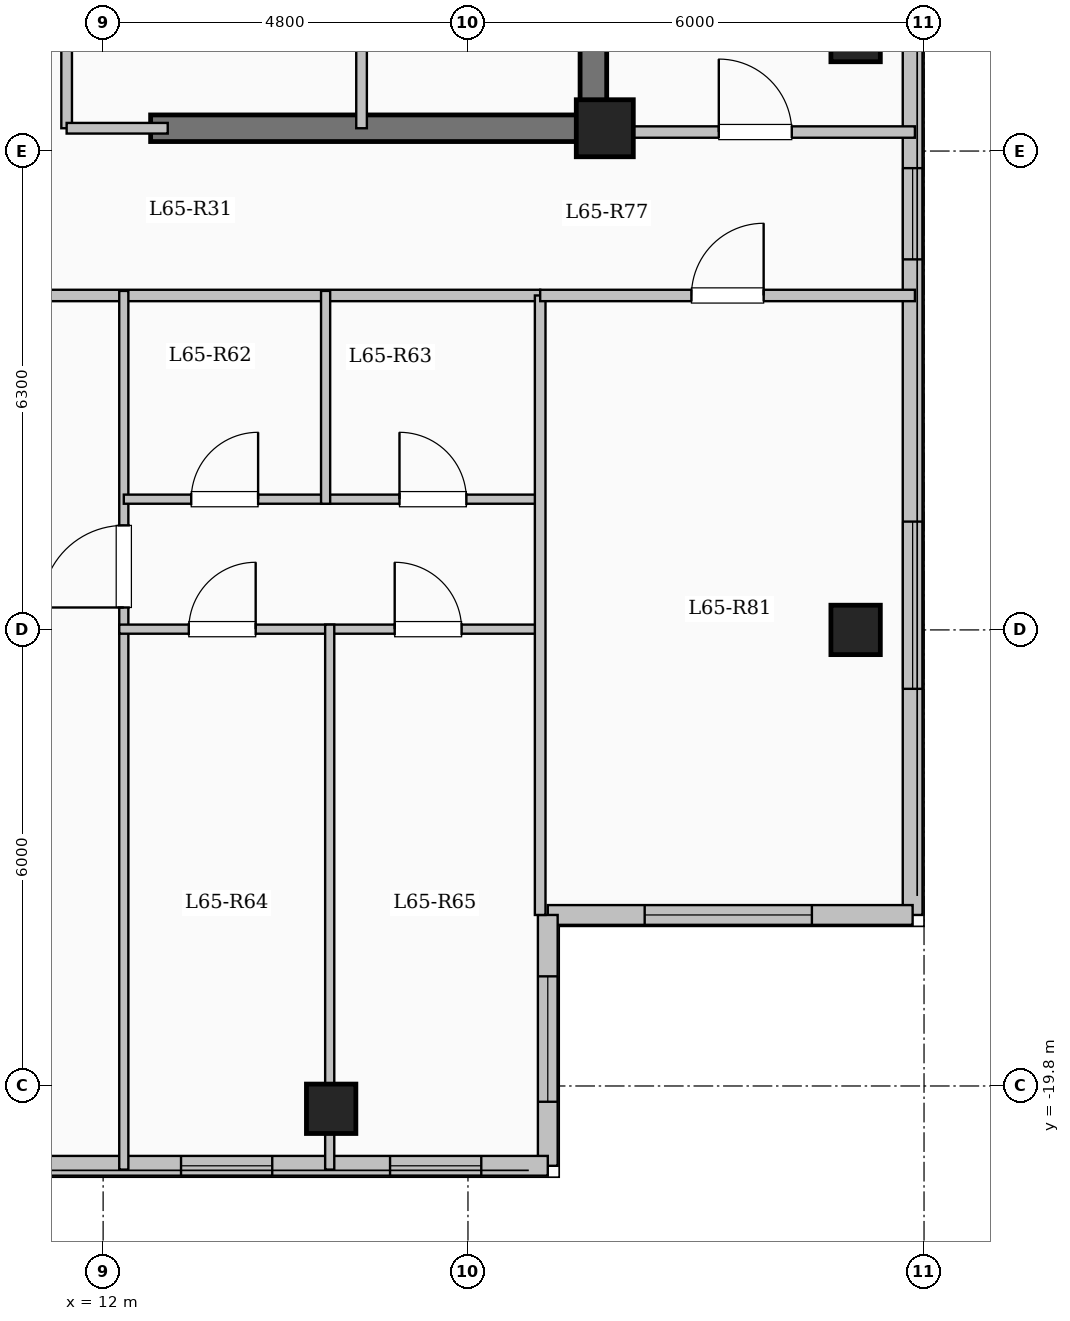
"""IFC4 building model, lengths in metres.
Left out: names, types, materials, properties, quantities, classifications, styles, units other than length and angle.
Written with IfcOpenShell. Run it as: python <this file> out.ifc"""

import sys

from ifc_helpers import new_model, si_unit, direction, frame, frame_2d, origin, origin_2d, place, context, subcontext, project, spatial, rectangle, extrude, element, fill, save


model = new_model("IFC4")
c1 = context("Model", 3, precision=1e-05, world=origin(), true_north=direction((0.0, 1.0)))
c2 = subcontext(c1, "Body", "Model", "MODEL_VIEW")
j1 = project(units=[si_unit("LENGTHUNIT", "METRE"), si_unit("PLANEANGLEUNIT", "RADIAN")], contexts=[c1])
p1 = place(None, origin())
s1 = spatial("IfcSite", under=j1, at=p1, CompositionType="ELEMENT")
p2 = place(p1, origin())
s2 = spatial("IfcBuilding", under=s1, at=p2, CompositionType="ELEMENT")
p3 = place(p2, frame((0.0, 0.0, 241.5)))
s3 = spatial("IfcBuildingStorey", under=s2, at=p3, CompositionType="ELEMENT", Elevation=241.5)
p4 = place(p3, frame((18.6, -7.2, 0.0), z_axis=(0.0, 0.0, 1.0), x_axis=(1.0, 0.0, 0.0)))
e1 = element("IfcColumn", 1, at=p4, inside=s3, PredefinedType="COLUMN", context=c2, shape_type="SweptSolid", body=[
    extrude(rectangle(XDim=0.75, YDim=0.75, at=origin_2d()), origin(), (0.0, 0.0, 1.0), 3.35),
])
for number, where, z_axis, x_axis in (
    (2, (15.0, -20.1, 0.0), (0.0, 0.0, 1.0), (1.0, 0.0, 0.0)),
    (3, (21.9, -13.8, 0.0), (0.0, 0.0, 1.0), (1.0, 0.0, 0.0)),
    (4, (21.9, -6.0, 0.0), (0.0, 0.0, 1.0), (1.0, 0.0, 0.0)),
):
    element("IfcColumn", number, at=place(p3, frame(where, z_axis=z_axis, x_axis=x_axis)), inside=s3, PredefinedType="COLUMN", context=c2, shape_type="SweptSolid", body=[
        extrude(rectangle(XDim=0.65, YDim=0.65, at=origin_2d()), origin(), (0.0, 0.0, 1.0), 3.35),
    ])
p5 = place(p3, frame((22.65, 17.55, 0.0), z_axis=(0.0, 0.0, 1.0), x_axis=(0.0, -1.0, 0.0)))
e5 = element("IfcWall", 5, at=p5, inside=s3, PredefinedType="SOLIDWALL", context=c2, shape_type="SweptSolid", body=[
    extrude(rectangle(XDim=35.1, YDim=0.26, at=frame_2d((17.55, 0.0))), origin(), (0.0, 0.0, 1.0), 3.1),
])
p6 = place(p5, frame((1.525, 0.0, 0.9)))
e6 = element("IfcOpeningElement", 6, at=p6, cuts=e5, PredefinedType="OPENING", context=c2, shape_type="SweptSolid", body=[
    extrude(rectangle(XDim=2.0, YDim=1.7, at=frame_2d((1.0, 0.85))), frame((0.0, 0.14, 0.0), z_axis=(0.0, -1.0, 0.0), x_axis=(1.0, 0.0, 0.0)), (0.0, 0.0, 1.0), 0.28),
])
p7 = place(p5, frame((5.425, 0.0, 0.95)))
e7 = element("IfcOpeningElement", 7, at=p7, cuts=e5, PredefinedType="OPENING", context=c2, shape_type="SweptSolid", body=[
    extrude(rectangle(XDim=1.0, YDim=1.5, at=frame_2d((0.5, 0.75))), frame((0.0, 0.14, 0.0), z_axis=(0.0, -1.0, 0.0), x_axis=(1.0, 0.0, 0.0)), (0.0, 0.0, 1.0), 0.28),
])
p8 = place(p5, frame((8.675, 0.0, 0.9)))
e8 = element("IfcOpeningElement", 8, at=p8, cuts=e5, PredefinedType="OPENING", context=c2, shape_type="SweptSolid", body=[
    extrude(rectangle(XDim=2.0, YDim=1.7, at=frame_2d((1.0, 0.85))), frame((0.0, 0.14, 0.0), z_axis=(0.0, -1.0, 0.0), x_axis=(1.0, 0.0, 0.0)), (0.0, 0.0, 1.0), 0.28),
])
p9 = place(p5, frame((13.5, 0.0, 0.9)))
e9 = element("IfcOpeningElement", 9, at=p9, cuts=e5, PredefinedType="OPENING", context=c2, shape_type="SweptSolid", body=[
    extrude(rectangle(XDim=1.65, YDim=1.6, at=frame_2d((0.825, 0.8))), frame((0.0, 0.14, 0.0), z_axis=(0.0, -1.0, 0.0), x_axis=(1.0, 0.0, 0.0)), (0.0, 0.0, 1.0), 0.28),
])
p10 = place(p5, frame((19.35, 0.0, 0.9)))
e10 = element("IfcOpeningElement", 10, at=p10, cuts=e5, PredefinedType="OPENING", context=c2, shape_type="SweptSolid", body=[
    extrude(rectangle(XDim=2.2, YDim=1.75, at=frame_2d((1.1, 0.875))), frame((0.0, 0.14, 0.0), z_axis=(0.0, -1.0, 0.0), x_axis=(1.0, 0.0, 0.0)), (0.0, 0.0, 1.0), 0.28),
])
p11 = place(p5, frame((25.275, 0.0, 0.95)))
e11 = element("IfcOpeningElement", 11, at=p11, cuts=e5, PredefinedType="OPENING", context=c2, shape_type="SweptSolid", body=[
    extrude(rectangle(XDim=1.2, YDim=1.5, at=frame_2d((0.6, 0.75))), frame((0.0, 0.14, 0.0), z_axis=(0.0, -1.0, 0.0), x_axis=(1.0, 0.0, 0.0)), (0.0, 0.0, 1.0), 0.28),
])
p12 = place(p5, frame((29.925, 0.0, 0.9)))
e12 = element("IfcOpeningElement", 12, at=p12, cuts=e5, PredefinedType="OPENING", context=c2, shape_type="SweptSolid", body=[
    extrude(rectangle(XDim=2.2, YDim=1.75, at=frame_2d((1.1, 0.875))), frame((0.0, 0.14, 0.0), z_axis=(0.0, -1.0, 0.0), x_axis=(1.0, 0.0, 0.0)), (0.0, 0.0, 1.0), 0.28),
])
p13 = place(p3, frame((22.65, -17.55, 0.0), z_axis=(0.0, 0.0, 1.0), x_axis=(-1.0, 0.0, 0.0)))
e13 = element("IfcWall", 13, at=p13, inside=s3, PredefinedType="SOLIDWALL", context=c2, shape_type="SweptSolid", body=[
    extrude(rectangle(XDim=4.8, YDim=0.26, at=frame_2d((2.4, 0.0))), origin(), (0.0, 0.0, 1.0), 3.1),
])
p14 = place(p13, frame((1.325, 0.0, 0.9)))
e14 = element("IfcOpeningElement", 14, at=p14, cuts=e13, PredefinedType="OPENING", context=c2, shape_type="SweptSolid", body=[
    extrude(rectangle(XDim=2.2, YDim=1.75, at=frame_2d((1.1, 0.875))), frame((0.0, 0.14, 0.0), z_axis=(0.0, -1.0, 0.0), x_axis=(1.0, 0.0, 0.0)), (0.0, 0.0, 1.0), 0.28),
])
p15 = place(p3, frame((17.85, -17.55, 0.0), z_axis=(0.0, 0.0, 1.0), x_axis=(0.0, -1.0, 0.0)))
e15 = element("IfcWall", 15, at=p15, inside=s3, PredefinedType="SOLIDWALL", context=c2, shape_type="SweptSolid", body=[
    extrude(rectangle(XDim=3.3, YDim=0.26, at=frame_2d((1.65, 0.0))), origin(), (0.0, 0.0, 1.0), 3.1),
])
p16 = place(p15, frame((0.808, 0.0, 0.9)))
e16 = element("IfcOpeningElement", 16, at=p16, cuts=e15, PredefinedType="OPENING", context=c2, shape_type="SweptSolid", body=[
    extrude(rectangle(XDim=1.65, YDim=1.6, at=frame_2d((0.825, 0.8))), frame((0.0, 0.14, 0.0), z_axis=(0.0, -1.0, 0.0), x_axis=(1.0, 0.0, 0.0)), (0.0, 0.0, 1.0), 0.28),
])
p17 = place(p3, frame((17.85, -20.85, 0.0), z_axis=(0.0, 0.0, 1.0), x_axis=(-1.0, 0.0, 0.0)))
e17 = element("IfcWall", 17, at=p17, inside=s3, PredefinedType="SOLIDWALL", context=c2, shape_type="SweptSolid", body=[
    extrude(rectangle(XDim=10.5, YDim=0.26, at=frame_2d((5.25, 0.0))), origin(), (0.0, 0.0, 1.0), 3.1),
])
p18 = place(p17, frame((0.875, 0.0, 0.95)))
e18 = element("IfcOpeningElement", 18, at=p18, cuts=e17, PredefinedType="OPENING", context=c2, shape_type="SweptSolid", body=[
    extrude(rectangle(XDim=1.2, YDim=1.5, at=frame_2d((0.6, 0.75))), frame((0.0, 0.14, 0.0), z_axis=(0.0, -1.0, 0.0), x_axis=(1.0, 0.0, 0.0)), (0.0, 0.0, 1.0), 0.28),
])
p19 = place(p17, frame((3.625, 0.0, 0.95)))
e19 = element("IfcOpeningElement", 19, at=p19, cuts=e17, PredefinedType="OPENING", context=c2, shape_type="SweptSolid", body=[
    extrude(rectangle(XDim=1.2, YDim=1.5, at=frame_2d((0.6, 0.75))), frame((0.0, 0.14, 0.0), z_axis=(0.0, -1.0, 0.0), x_axis=(1.0, 0.0, 0.0)), (0.0, 0.0, 1.0), 0.28),
])
p20 = place(p17, frame((6.6, 0.0, 0.9)))
e20 = element("IfcOpeningElement", 20, at=p20, cuts=e17, PredefinedType="OPENING", context=c2, shape_type="SweptSolid", body=[
    extrude(rectangle(XDim=1.65, YDim=1.6, at=frame_2d((0.825, 0.8))), frame((0.0, 0.14, 0.0), z_axis=(0.0, -1.0, 0.0), x_axis=(1.0, 0.0, 0.0)), (0.0, 0.0, 1.0), 0.28),
])
p21 = place(p17, frame((9.505, 0.0, 0.95)))
e21 = element("IfcOpeningElement", 21, at=p21, cuts=e17, PredefinedType="OPENING", context=c2, shape_type="SweptSolid", body=[
    extrude(rectangle(XDim=0.85, YDim=1.5, at=frame_2d((0.425, 0.75))), frame((0.0, 0.14, 0.0), z_axis=(0.0, -1.0, 0.0), x_axis=(1.0, 0.0, 0.0)), (0.0, 0.0, 1.0), 0.28),
])
p22 = place(p3, frame((18.45, -7.375, 0.0), z_axis=(0.0, 0.0, 1.0), x_axis=(0.0, 1.0, 0.0)))
e22 = element("IfcWall", 22, at=p22, inside=s3, PredefinedType="SHEAR", context=c2, shape_type="SweptSolid", body=[
    extrude(rectangle(XDim=14.05, YDim=0.35, at=frame_2d((7.025, 0.0))), origin(), (0.0, 0.0, 1.0), 3.35),
])
p23 = place(p3, frame((12.625, -7.2, 0.0), z_axis=(0.0, 0.0, 1.0), x_axis=(1.0, 0.0, 0.0)))
e23 = element("IfcWall", 23, at=p23, inside=s3, PredefinedType="SHEAR", context=c2, shape_type="SweptSolid", body=[
    extrude(rectangle(XDim=6.0, YDim=0.35, at=frame_2d((3.0, 0.0))), origin(), (0.0, 0.0, 1.0), 3.35),
])
p24 = place(p3, frame((15.4, -7.2, 0.0), z_axis=(0.0, 0.0, 1.0), x_axis=(0.0, 1.0, 0.0)))
e24 = element("IfcWall", 24, at=p24, inside=s3, PredefinedType="PARTITIONING", context=c2, shape_type="SweptSolid", body=[
    extrude(rectangle(XDim=10.45, YDim=0.14, at=frame_2d((5.225, 0.0))), origin(), (0.0, 0.0, 1.0), 3.1),
])
p25 = place(p24, frame((9.25, 0.0, 0.0)))
e25 = element("IfcOpeningElement", 25, at=p25, cuts=e24, PredefinedType="OPENING", context=c2, shape_type="SweptSolid", body=[
    extrude(rectangle(XDim=0.9, YDim=2.08, at=frame_2d((0.45, 1.04))), frame((0.0, 0.08, 0.0), z_axis=(0.0, -1.0, 0.0), x_axis=(1.0, 0.0, 0.0)), (0.0, 0.0, 1.0), 0.16),
])
p26 = place(p3, frame((11.52, -7.2, 0.0), z_axis=(0.0, 0.0, 1.0), x_axis=(0.0, 1.0, 0.0)))
e26 = element("IfcWall", 26, at=p26, inside=s3, PredefinedType="PARTITIONING", context=c2, shape_type="SweptSolid", body=[
    extrude(rectangle(XDim=9.12, YDim=0.14, at=frame_2d((4.56, 0.0))), origin(), (0.0, 0.0, 1.0), 3.1),
])
p27 = place(p26, frame((3.8, 0.0, 0.0)))
e27 = element("IfcOpeningElement", 27, at=p27, cuts=e26, PredefinedType="OPENING", context=c2, shape_type="SweptSolid", body=[
    extrude(rectangle(XDim=0.9, YDim=2.08, at=frame_2d((0.45, 1.04))), frame((0.0, 0.08, 0.0), z_axis=(0.0, -1.0, 0.0), x_axis=(1.0, 0.0, 0.0)), (0.0, 0.0, 1.0), 0.16),
])
p28 = place(p3, frame((11.52, -7.2, 0.0), z_axis=(0.0, 0.0, 1.0), x_axis=(1.0, 0.0, 0.0)))
e28 = element("IfcWall", 28, at=p28, inside=s3, PredefinedType="PARTITIONING", context=c2, shape_type="SweptSolid", body=[
    extrude(rectangle(XDim=1.33, YDim=0.14, at=frame_2d((0.665, 0.0))), origin(), (0.0, 0.0, 1.0), 2.235),
])
p29 = place(p3, frame((8.55, -9.4, 0.0), z_axis=(0.0, 0.0, 1.0), x_axis=(1.0, 0.0, 0.0)))
e29 = element("IfcWall", 29, at=p29, inside=s3, PredefinedType="PARTITIONING", context=c2, shape_type="SweptSolid", body=[
    extrude(rectangle(XDim=9.2, YDim=0.15, at=frame_2d((4.6, 0.0))), origin(), (0.0, 0.0, 1.0), 3.1),
])
p30 = place(p29, frame((0.75, 0.0, 0.0)))
e30 = element("IfcOpeningElement", 30, at=p30, cuts=e29, PredefinedType="OPENING", context=c2, shape_type="SweptSolid", body=[
    extrude(rectangle(XDim=0.96, YDim=2.15, at=frame_2d((0.48, 1.075))), frame((0.0, 0.085, 0.0), z_axis=(0.0, -1.0, 0.0), x_axis=(1.0, 0.0, 0.0)), (0.0, 0.0, 1.0), 0.17),
])
p31 = place(p3, frame((12.272, -20.9, 0.0), z_axis=(0.0, 0.0, 1.0), x_axis=(0.0, 1.0, 0.0)))
e31 = element("IfcWall", 31, at=p31, inside=s3, PredefinedType="PARTITIONING", context=c2, shape_type="SweptSolid", body=[
    extrude(rectangle(XDim=11.56, YDim=0.12, at=frame_2d((5.78, 0.0))), origin(), (0.0, 0.0, 1.0), 3.1),
])
p32 = place(p31, frame((7.395, 0.0, 0.0)))
e32 = element("IfcOpeningElement", 32, at=p32, cuts=e31, PredefinedType="OPENING", context=c2, shape_type="SweptSolid", body=[
    extrude(rectangle(XDim=1.08, YDim=2.15, at=frame_2d((0.54, 1.075))), frame((0.0, 0.07, 0.0), z_axis=(0.0, -1.0, 0.0), x_axis=(1.0, 0.0, 0.0)), (0.0, 0.0, 1.0), 0.14),
])
p33 = place(p3, frame((12.272, -12.08, 0.0), z_axis=(0.0, 0.0, 1.0), x_axis=(1.0, 0.0, 0.0)))
e33 = element("IfcWall", 33, at=p33, inside=s3, PredefinedType="PARTITIONING", context=c2, shape_type="SweptSolid", body=[
    extrude(rectangle(XDim=2.655, YDim=0.12, at=frame_2d((1.328, 0.0))), origin(), (0.0, 0.0, 1.0), 2.785),
])
p34 = place(p33, frame((0.887, 0.0, 0.0)))
e34 = element("IfcOpeningElement", 34, at=p34, cuts=e33, PredefinedType="OPENING", context=c2, shape_type="SweptSolid", body=[
    extrude(rectangle(XDim=0.88, YDim=2.1, at=frame_2d((0.44, 1.05))), frame((0.0, 0.07, 0.0), z_axis=(0.0, -1.0, 0.0), x_axis=(1.0, 0.0, 0.0)), (0.0, 0.0, 1.0), 0.14),
])
p35 = place(p3, frame((14.927, -12.08, 0.0), z_axis=(0.0, 0.0, 1.0), x_axis=(1.0, 0.0, 0.0)))
e35 = element("IfcWall", 35, at=p35, inside=s3, PredefinedType="PARTITIONING", context=c2, shape_type="SweptSolid", body=[
    extrude(rectangle(XDim=2.823, YDim=0.12, at=frame_2d((1.412, 0.0))), origin(), (0.0, 0.0, 1.0), 3.1),
])
p36 = place(p35, frame((0.972, 0.0, 0.0)))
e36 = element("IfcOpeningElement", 36, at=p36, cuts=e35, PredefinedType="OPENING", context=c2, shape_type="SweptSolid", body=[
    extrude(rectangle(XDim=0.88, YDim=2.1, at=frame_2d((0.44, 1.05))), frame((0.0, 0.07, 0.0), z_axis=(0.0, -1.0, 0.0), x_axis=(1.0, 0.0, 0.0)), (0.0, 0.0, 1.0), 0.14),
])
p37 = place(p3, frame((12.212, -13.79, 0.0), z_axis=(0.0, 0.0, 1.0), x_axis=(1.0, 0.0, 0.0)))
e37 = element("IfcWall", 37, at=p37, inside=s3, PredefinedType="PARTITIONING", context=c2, shape_type="SweptSolid", body=[
    extrude(rectangle(XDim=5.598, YDim=0.12, at=frame_2d((2.799, 0.0))), origin(), (0.0, 0.0, 1.0), 2.785),
])
p38 = place(p37, frame((0.915, 0.0, 0.0)))
e38 = element("IfcOpeningElement", 38, at=p38, cuts=e37, PredefinedType="OPENING", context=c2, shape_type="SweptSolid", body=[
    extrude(rectangle(XDim=0.88, YDim=2.1, at=frame_2d((0.44, 1.05))), frame((0.0, 0.07, 0.0), z_axis=(0.0, -1.0, 0.0), x_axis=(1.0, 0.0, 0.0)), (0.0, 0.0, 1.0), 0.14),
])
p39 = place(p37, frame((3.624, 0.0, 0.0)))
e39 = element("IfcOpeningElement", 39, at=p39, cuts=e37, PredefinedType="OPENING", context=c2, shape_type="SweptSolid", body=[
    extrude(rectangle(XDim=0.88, YDim=2.1, at=frame_2d((0.44, 1.05))), frame((0.0, 0.07, 0.0), z_axis=(0.0, -1.0, 0.0), x_axis=(1.0, 0.0, 0.0)), (0.0, 0.0, 1.0), 0.14),
])
p40 = place(p3, frame((14.927, -12.14, 0.0), z_axis=(0.0, 0.0, 1.0), x_axis=(0.0, 1.0, 0.0)))
e40 = element("IfcWall", 40, at=p40, inside=s3, PredefinedType="PARTITIONING", context=c2, shape_type="SweptSolid", body=[
    extrude(rectangle(XDim=2.8, YDim=0.12, at=frame_2d((1.4, 0.0))), origin(), (0.0, 0.0, 1.0), 2.685),
])
p41 = place(p3, frame((14.981, -20.9, 0.0), z_axis=(0.0, 0.0, 1.0), x_axis=(0.0, 1.0, 0.0)))
e41 = element("IfcWall", 41, at=p41, inside=s3, PredefinedType="PARTITIONING", context=c2, shape_type="SweptSolid", body=[
    extrude(rectangle(XDim=7.17, YDim=0.12, at=frame_2d((3.585, 0.0))), origin(), (0.0, 0.0, 1.0), 2.685),
])
p42 = place(p3, frame((18.45, -7.25, 0.0), z_axis=(0.0, 0.0, 1.0), x_axis=(1.0, 0.0, 0.0)))
e42 = element("IfcWall", 42, at=p42, inside=s3, PredefinedType="PARTITIONING", context=c2, shape_type="SweptSolid", body=[
    extrude(rectangle(XDim=4.23, YDim=0.15, at=frame_2d((2.115, 0.0))), origin(), (0.0, 0.0, 1.0), 3.1),
])
p43 = place(p42, frame((1.65, 0.0, 0.0)))
e43 = element("IfcOpeningElement", 43, at=p43, cuts=e42, PredefinedType="OPENING", context=c2, shape_type="SweptSolid", body=[
    extrude(rectangle(XDim=0.96, YDim=2.15, at=frame_2d((0.48, 1.075))), frame((0.0, 0.085, 0.0), z_axis=(0.0, -1.0, 0.0), x_axis=(1.0, 0.0, 0.0)), (0.0, 0.0, 1.0), 0.17),
])
p44 = place(p3, frame((17.75, -17.55, 0.0), z_axis=(0.0, 0.0, 1.0), x_axis=(0.0, 1.0, 0.0)))
e44 = element("IfcWall", 44, at=p44, inside=s3, PredefinedType="PARTITIONING", context=c2, shape_type="SweptSolid", body=[
    extrude(rectangle(XDim=8.15, YDim=0.14, at=frame_2d((4.075, 0.0))), origin(), (0.0, 0.0, 1.0), 3.1),
])
p45 = place(p3, frame((17.75, -9.4, 0.0), z_axis=(0.0, 0.0, 1.0), x_axis=(1.0, 0.0, 0.0)))
e45 = element("IfcWall", 45, at=p45, inside=s3, PredefinedType="PARTITIONING", context=c2, shape_type="SweptSolid", body=[
    extrude(rectangle(XDim=4.93, YDim=0.15, at=frame_2d((2.465, 0.0))), origin(), (0.0, 0.0, 1.0), 3.1),
])
p46 = place(p45, frame((1.99, 0.0, 0.0)))
e46 = element("IfcOpeningElement", 46, at=p46, cuts=e45, PredefinedType="OPENING", context=c2, shape_type="SweptSolid", body=[
    extrude(rectangle(XDim=0.95, YDim=2.15, at=frame_2d((0.475, 1.075))), frame((0.0, 0.085, 0.0), z_axis=(0.0, -1.0, 0.0), x_axis=(1.0, 0.0, 0.0)), (0.0, 0.0, 1.0), 0.17),
])
p47 = place(p11, origin())
e47 = element("IfcWindow", 47, at=p47, inside=s3, PartitioningType="SINGLE_PANEL", PredefinedType="WINDOW", context=c2, shape_type="SweptSolid", body=[
    extrude(rectangle(XDim=1.2, YDim=1.5, at=frame_2d((0.6, 0.75))), frame((0.0, 0.03, 0.0), z_axis=(0.0, -1.0, 0.0), x_axis=(1.0, 0.0, 0.0)), (0.0, 0.0, 1.0), 0.06),
])
fill(e11, e47)
p48 = place(p12, origin())
e48 = element("IfcWindow", 48, at=p48, inside=s3, PartitioningType="SINGLE_PANEL", PredefinedType="WINDOW", context=c2, shape_type="SweptSolid", body=[
    extrude(rectangle(XDim=2.2, YDim=1.75, at=frame_2d((1.1, 0.875))), frame((0.0, 0.03, 0.0), z_axis=(0.0, -1.0, 0.0), x_axis=(1.0, 0.0, 0.0)), (0.0, 0.0, 1.0), 0.06),
])
fill(e12, e48)
p49 = place(p14, origin())
e49 = element("IfcWindow", 49, at=p49, inside=s3, PartitioningType="SINGLE_PANEL", PredefinedType="WINDOW", context=c2, shape_type="SweptSolid", body=[
    extrude(rectangle(XDim=2.2, YDim=1.75, at=frame_2d((1.1, 0.875))), frame((0.0, 0.03, 0.0), z_axis=(0.0, -1.0, 0.0), x_axis=(1.0, 0.0, 0.0)), (0.0, 0.0, 1.0), 0.06),
])
fill(e14, e49)
p50 = place(p16, origin())
e50 = element("IfcWindow", 50, at=p50, inside=s3, PartitioningType="SINGLE_PANEL", PredefinedType="WINDOW", context=c2, shape_type="SweptSolid", body=[
    extrude(rectangle(XDim=1.65, YDim=1.6, at=frame_2d((0.825, 0.8))), frame((0.0, 0.03, 0.0), z_axis=(0.0, -1.0, 0.0), x_axis=(1.0, 0.0, 0.0)), (0.0, 0.0, 1.0), 0.06),
])
fill(e16, e50)
p51 = place(p18, origin())
e51 = element("IfcWindow", 51, at=p51, inside=s3, PartitioningType="SINGLE_PANEL", PredefinedType="WINDOW", context=c2, shape_type="SweptSolid", body=[
    extrude(rectangle(XDim=1.2, YDim=1.5, at=frame_2d((0.6, 0.75))), frame((0.0, 0.03, 0.0), z_axis=(0.0, -1.0, 0.0), x_axis=(1.0, 0.0, 0.0)), (0.0, 0.0, 1.0), 0.06),
])
fill(e18, e51)
p52 = place(p19, origin())
e52 = element("IfcWindow", 52, at=p52, inside=s3, PartitioningType="SINGLE_PANEL", PredefinedType="WINDOW", context=c2, shape_type="SweptSolid", body=[
    extrude(rectangle(XDim=1.2, YDim=1.5, at=frame_2d((0.6, 0.75))), frame((0.0, 0.03, 0.0), z_axis=(0.0, -1.0, 0.0), x_axis=(1.0, 0.0, 0.0)), (0.0, 0.0, 1.0), 0.06),
])
fill(e19, e52)
p53 = place(p32, origin())
e53 = element("IfcDoor", 53, at=p53, inside=s3, OperationType="SINGLE_SWING_LEFT", PredefinedType="DOOR", context=c2, shape_type="SweptSolid", body=[
    extrude(rectangle(XDim=1.08, YDim=2.15, at=frame_2d((0.54, 1.075))), frame((0.0, 0.025, 0.0), z_axis=(0.0, -1.0, 0.0), x_axis=(1.0, 0.0, 0.0)), (0.0, 0.0, 1.0), 0.05),
])
fill(e32, e53)
p54 = place(p34, origin())
e54 = element("IfcDoor", 54, at=p54, inside=s3, OperationType="SINGLE_SWING_RIGHT", PredefinedType="DOOR", context=c2, shape_type="SweptSolid", body=[
    extrude(rectangle(XDim=0.88, YDim=2.1, at=frame_2d((0.44, 1.05))), frame((0.0, 0.025, 0.0), z_axis=(0.0, -1.0, 0.0), x_axis=(1.0, 0.0, 0.0)), (0.0, 0.0, 1.0), 0.05),
])
fill(e34, e54)
p55 = place(p36, origin())
e55 = element("IfcDoor", 55, at=p55, inside=s3, OperationType="SINGLE_SWING_LEFT", PredefinedType="DOOR", context=c2, shape_type="SweptSolid", body=[
    extrude(rectangle(XDim=0.88, YDim=2.1, at=frame_2d((0.44, 1.05))), frame((0.0, 0.025, 0.0), z_axis=(0.0, -1.0, 0.0), x_axis=(1.0, 0.0, 0.0)), (0.0, 0.0, 1.0), 0.05),
])
fill(e36, e55)
p56 = place(p38, origin())
e56 = element("IfcDoor", 56, at=p56, inside=s3, OperationType="SINGLE_SWING_RIGHT", PredefinedType="DOOR", context=c2, shape_type="SweptSolid", body=[
    extrude(rectangle(XDim=0.88, YDim=2.1, at=frame_2d((0.44, 1.05))), frame((0.0, 0.025, 0.0), z_axis=(0.0, -1.0, 0.0), x_axis=(1.0, 0.0, 0.0)), (0.0, 0.0, 1.0), 0.05),
])
fill(e38, e56)
p57 = place(p39, origin())
e57 = element("IfcDoor", 57, at=p57, inside=s3, OperationType="SINGLE_SWING_LEFT", PredefinedType="DOOR", context=c2, shape_type="SweptSolid", body=[
    extrude(rectangle(XDim=0.88, YDim=2.1, at=frame_2d((0.44, 1.05))), frame((0.0, 0.025, 0.0), z_axis=(0.0, -1.0, 0.0), x_axis=(1.0, 0.0, 0.0)), (0.0, 0.0, 1.0), 0.05),
])
fill(e39, e57)
p58 = place(p46, origin())
e58 = element("IfcDoor", 58, at=p58, inside=s3, OperationType="SINGLE_SWING_RIGHT", PredefinedType="DOOR", context=c2, shape_type="SweptSolid", body=[
    extrude(rectangle(XDim=0.95, YDim=2.15, at=frame_2d((0.475, 1.075))), frame((0.0, 0.025, 0.0), z_axis=(0.0, -1.0, 0.0), x_axis=(1.0, 0.0, 0.0)), (0.0, 0.0, 1.0), 0.05),
])
fill(e46, e58)
p59 = place(p43, origin())
e59 = element("IfcDoor", 59, at=p59, inside=s3, OperationType="SINGLE_SWING_LEFT", PredefinedType="DOOR", context=c2, shape_type="SweptSolid", body=[
    extrude(rectangle(XDim=0.96, YDim=2.15, at=frame_2d((0.48, 1.075))), frame((0.0, 0.025, 0.0), z_axis=(0.0, -1.0, 0.0), x_axis=(1.0, 0.0, 0.0)), (0.0, 0.0, 1.0), 0.05),
])
fill(e43, e59)
save(model, sys.argv[1])
